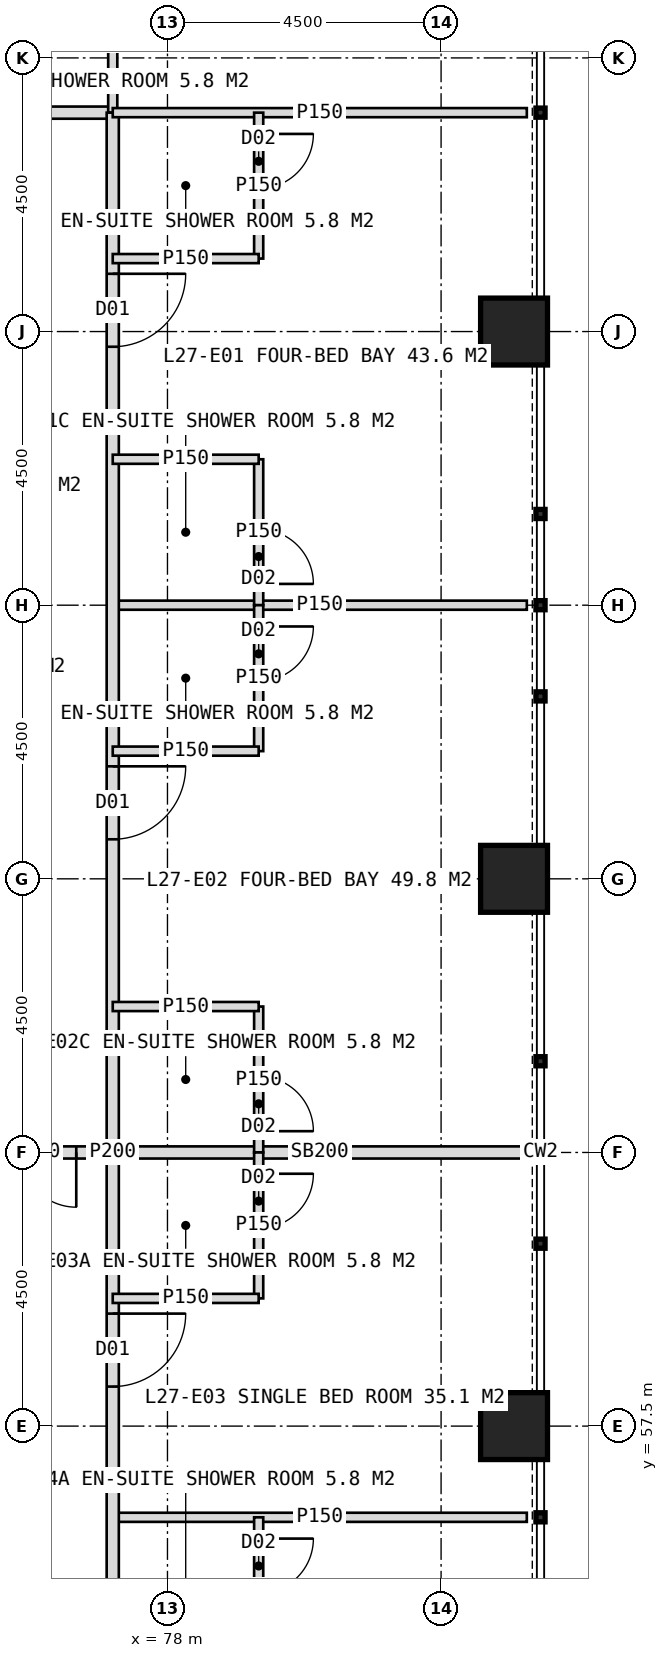
"""IFC4 building model, lengths in metres.
Left out: names, types, materials, properties, quantities, classifications, styles, units other than length and angle.
Written with IfcOpenShell. Run it as: python <this file> out.ifc"""

import sys

from ifc_helpers import new_model, si_unit, direction, frame, frame_2d, origin, origin_2d, place, context, subcontext, project, spatial, rectangle, hollow_rectangle, extrude, element, fill, save


model = new_model("IFC4")
c1 = context("Model", 3, precision=1e-05, world=origin(), true_north=direction((0.0, 1.0)))
c2 = subcontext(c1, "Body", "Model", "MODEL_VIEW")
j1 = project(units=[si_unit("LENGTHUNIT", "METRE"), si_unit("PLANEANGLEUNIT", "RADIAN")], contexts=[c1])
p1 = place(None, origin())
s1 = spatial("IfcSite", under=j1, at=p1, CompositionType="ELEMENT")
p2 = place(p1, origin())
s2 = spatial("IfcBuilding", under=s1, at=p2, CompositionType="ELEMENT")
p3 = place(p2, frame((0.0, 0.0, 116.0)))
s3 = spatial("IfcBuildingStorey", under=s2, at=p3, CompositionType="ELEMENT", Elevation=116.0)
for number, where, z_axis, x_axis in (
    (1, (83.7, 57.5, 0.0), (0.0, 0.0, 1.0), (1.0, 0.0, 0.0)),
    (2, (83.7, 66.5, 0.0), (0.0, 0.0, 1.0), (1.0, 0.0, 0.0)),
    (3, (83.7, 75.5, 0.0), (0.0, 0.0, 1.0), (1.0, 0.0, 0.0)),
):
    element("IfcColumn", number, at=place(p3, frame(where, z_axis=z_axis, x_axis=x_axis)), inside=s3, PredefinedType="COLUMN", context=c2, shape_type="SweptSolid", body=[
        extrude(hollow_rectangle(XDim=1.1, YDim=1.1, WallThickness=0.1, at=origin_2d()), origin(), (0.0, 0.0, 1.0), 4.0),
    ])
p4 = place(p3, frame((42.9, 79.1, 0.0), z_axis=(0.0, 0.0, 1.0), x_axis=(1.0, 0.0, 0.0)))
e4 = element("IfcWall", 4, at=p4, inside=s3, PredefinedType="PARTITIONING", context=c2, shape_type="SweptSolid", body=[
    extrude(rectangle(XDim=34.2, YDim=0.2, at=frame_2d((17.1, 0.0))), origin(), (0.0, 0.0, 1.0), 3.75),
])
p5 = place(p4, frame((3.25, 0.0, 0.0)))
e5 = element("IfcOpeningElement", 5, at=p5, cuts=e4, PredefinedType="OPENING", context=c2, shape_type="SweptSolid", body=[
    extrude(rectangle(XDim=1.2, YDim=2.2, at=frame_2d((0.6, 1.1))), frame((0.0, 0.11, 0.0), z_axis=(0.0, -1.0, 0.0), x_axis=(1.0, 0.0, 0.0)), (0.0, 0.0, 1.0), 0.22),
])
p6 = place(p4, frame((9.25, 0.0, 0.0)))
e6 = element("IfcOpeningElement", 6, at=p6, cuts=e4, PredefinedType="OPENING", context=c2, shape_type="SweptSolid", body=[
    extrude(rectangle(XDim=1.2, YDim=2.2, at=frame_2d((0.6, 1.1))), frame((0.0, 0.11, 0.0), z_axis=(0.0, -1.0, 0.0), x_axis=(1.0, 0.0, 0.0)), (0.0, 0.0, 1.0), 0.22),
])
p7 = place(p4, frame((13.75, 0.0, 0.0)))
e7 = element("IfcOpeningElement", 7, at=p7, cuts=e4, PredefinedType="OPENING", context=c2, shape_type="SweptSolid", body=[
    extrude(rectangle(XDim=1.2, YDim=2.2, at=frame_2d((0.6, 1.1))), frame((0.0, 0.11, 0.0), z_axis=(0.0, -1.0, 0.0), x_axis=(1.0, 0.0, 0.0)), (0.0, 0.0, 1.0), 0.22),
])
p8 = place(p4, frame((19.6, 0.0, 0.0)))
e8 = element("IfcOpeningElement", 8, at=p8, cuts=e4, PredefinedType="OPENING", context=c2, shape_type="SweptSolid", body=[
    extrude(rectangle(XDim=1.0, YDim=2.1, at=frame_2d((0.5, 1.05))), frame((0.0, 0.11, 0.0), z_axis=(0.0, -1.0, 0.0), x_axis=(1.0, 0.0, 0.0)), (0.0, 0.0, 1.0), 0.22),
])
p9 = place(p4, frame((27.25, 0.0, 0.0)))
e9 = element("IfcOpeningElement", 9, at=p9, cuts=e4, PredefinedType="OPENING", context=c2, shape_type="SweptSolid", body=[
    extrude(rectangle(XDim=1.2, YDim=2.2, at=frame_2d((0.6, 1.1))), frame((0.0, 0.11, 0.0), z_axis=(0.0, -1.0, 0.0), x_axis=(1.0, 0.0, 0.0)), (0.0, 0.0, 1.0), 0.22),
])
p10 = place(p3, frame((77.1, 79.1, 0.0), z_axis=(0.0, 0.0, 1.0), x_axis=(0.0, 1.0, 0.0)))
e10 = element("IfcWall", 10, at=p10, inside=s3, PredefinedType="PARTITIONING", context=c2, shape_type="SweptSolid", body=[
    extrude(rectangle(XDim=2.4, YDim=0.15, at=frame_2d((1.2, 0.0))), origin(), (0.0, 0.0, 1.0), 3.75),
])
p11 = place(p3, frame((77.1, 71.0, 0.0), z_axis=(0.0, 0.0, 1.0), x_axis=(1.0, 0.0, 0.0)))
e11 = element("IfcWall", 11, at=p11, inside=s3, PredefinedType="PARTITIONING", context=c2, shape_type="SweptSolid", body=[
    extrude(rectangle(XDim=6.81, YDim=0.15, at=frame_2d((3.405, 0.0))), origin(), (0.0, 0.0, 1.0), 3.75),
])
p12 = place(p3, frame((77.1, 62.0, 0.0), z_axis=(0.0, 0.0, 1.0), x_axis=(1.0, 0.0, 0.0)))
e12 = element("IfcWall", 12, at=p12, inside=s3, PredefinedType="SOLIDWALL", context=c2, shape_type="SweptSolid", body=[
    extrude(rectangle(XDim=6.81, YDim=0.2, at=frame_2d((3.405, 0.0))), origin(), (0.0, 0.0, 1.0), 2.95),
])
p13 = place(p3, frame((77.1, 56.0, 0.0), z_axis=(0.0, 0.0, 1.0), x_axis=(1.0, 0.0, 0.0)))
e13 = element("IfcWall", 13, at=p13, inside=s3, PredefinedType="PARTITIONING", context=c2, shape_type="SweptSolid", body=[
    extrude(rectangle(XDim=6.81, YDim=0.15, at=frame_2d((3.405, 0.0))), origin(), (0.0, 0.0, 1.0), 3.75),
])
p14 = place(p3, frame((77.1, 79.1, 0.0), z_axis=(0.0, 0.0, 1.0), x_axis=(0.0, -1.0, 0.0)))
e14 = element("IfcWall", 14, at=p14, inside=s3, PredefinedType="PARTITIONING", context=c2, shape_type="SweptSolid", body=[
    extrude(rectangle(XDim=34.2, YDim=0.2, at=frame_2d((17.1, 0.0))), origin(), (0.0, 0.0, 1.0), 3.75),
])
p15 = place(p14, frame((2.65, 0.0, 0.0)))
e15 = element("IfcOpeningElement", 15, at=p15, cuts=e14, PredefinedType="OPENING", context=c2, shape_type="SweptSolid", body=[
    extrude(rectangle(XDim=1.2, YDim=2.2, at=frame_2d((0.6, 1.1))), frame((0.0, 0.11, 0.0), z_axis=(0.0, -1.0, 0.0), x_axis=(1.0, 0.0, 0.0)), (0.0, 0.0, 1.0), 0.22),
])
p16 = place(p14, frame((10.75, 0.0, 0.0)))
e16 = element("IfcOpeningElement", 16, at=p16, cuts=e14, PredefinedType="OPENING", context=c2, shape_type="SweptSolid", body=[
    extrude(rectangle(XDim=1.2, YDim=2.2, at=frame_2d((0.6, 1.1))), frame((0.0, 0.11, 0.0), z_axis=(0.0, -1.0, 0.0), x_axis=(1.0, 0.0, 0.0)), (0.0, 0.0, 1.0), 0.22),
])
p17 = place(p14, frame((19.75, 0.0, 0.0)))
e17 = element("IfcOpeningElement", 17, at=p17, cuts=e14, PredefinedType="OPENING", context=c2, shape_type="SweptSolid", body=[
    extrude(rectangle(XDim=1.2, YDim=2.2, at=frame_2d((0.6, 1.1))), frame((0.0, 0.11, 0.0), z_axis=(0.0, -1.0, 0.0), x_axis=(1.0, 0.0, 0.0)), (0.0, 0.0, 1.0), 0.22),
])
p18 = place(p14, frame((25.75, 0.0, 0.0)))
e18 = element("IfcOpeningElement", 18, at=p18, cuts=e14, PredefinedType="OPENING", context=c2, shape_type="SweptSolid", body=[
    extrude(rectangle(XDim=1.2, YDim=2.2, at=frame_2d((0.6, 1.1))), frame((0.0, 0.11, 0.0), z_axis=(0.0, -1.0, 0.0), x_axis=(1.0, 0.0, 0.0)), (0.0, 0.0, 1.0), 0.22),
])
p19 = place(p14, frame((30.25, 0.0, 0.0)))
e19 = element("IfcOpeningElement", 19, at=p19, cuts=e14, PredefinedType="OPENING", context=c2, shape_type="SweptSolid", body=[
    extrude(rectangle(XDim=1.2, YDim=2.2, at=frame_2d((0.6, 1.1))), frame((0.0, 0.11, 0.0), z_axis=(0.0, -1.0, 0.0), x_axis=(1.0, 0.0, 0.0)), (0.0, 0.0, 1.0), 0.22),
])
p20 = place(p3, frame((77.1, 79.1, 0.0), z_axis=(0.0, 0.0, 1.0), x_axis=(1.0, 0.0, 0.0)))
e20 = element("IfcWall", 20, at=p20, inside=s3, PredefinedType="PARTITIONING", context=c2, shape_type="SweptSolid", body=[
    extrude(rectangle(XDim=6.81, YDim=0.15, at=frame_2d((3.405, 0.0))), origin(), (0.0, 0.0, 1.0), 3.75),
])
p21 = place(p3, frame((79.5, 79.1, 0.0), z_axis=(0.0, 0.0, 1.0), x_axis=(0.0, -1.0, 0.0)))
e21 = element("IfcWall", 21, at=p21, inside=s3, PredefinedType="PARTITIONING", context=c2, shape_type="SweptSolid", body=[
    extrude(rectangle(XDim=2.4, YDim=0.15, at=frame_2d((1.2, 0.0))), origin(), (0.0, 0.0, 1.0), 3.75),
])
p22 = place(p21, frame((0.35, 0.0, 0.0)))
e22 = element("IfcOpeningElement", 22, at=p22, cuts=e21, PredefinedType="OPENING", context=c2, shape_type="SweptSolid", body=[
    extrude(rectangle(XDim=0.9, YDim=2.1, at=frame_2d((0.45, 1.05))), frame((0.0, 0.085, 0.0), z_axis=(0.0, -1.0, 0.0), x_axis=(1.0, 0.0, 0.0)), (0.0, 0.0, 1.0), 0.17),
])
p23 = place(p3, frame((77.1, 76.7, 0.0), z_axis=(0.0, 0.0, 1.0), x_axis=(1.0, 0.0, 0.0)))
e23 = element("IfcWall", 23, at=p23, inside=s3, PredefinedType="PARTITIONING", context=c2, shape_type="SweptSolid", body=[
    extrude(rectangle(XDim=2.4, YDim=0.15, at=frame_2d((1.2, 0.0))), origin(), (0.0, 0.0, 1.0), 3.75),
])
p24 = place(p3, frame((79.5, 73.4, 0.0), z_axis=(0.0, 0.0, 1.0), x_axis=(0.0, -1.0, 0.0)))
e24 = element("IfcWall", 24, at=p24, inside=s3, PredefinedType="PARTITIONING", context=c2, shape_type="SweptSolid", body=[
    extrude(rectangle(XDim=2.4, YDim=0.15, at=frame_2d((1.2, 0.0))), origin(), (0.0, 0.0, 1.0), 3.75),
])
p25 = place(p24, frame((1.15, 0.0, 0.0)))
e25 = element("IfcOpeningElement", 25, at=p25, cuts=e24, PredefinedType="OPENING", context=c2, shape_type="SweptSolid", body=[
    extrude(rectangle(XDim=0.9, YDim=2.1, at=frame_2d((0.45, 1.05))), frame((0.0, 0.085, 0.0), z_axis=(0.0, -1.0, 0.0), x_axis=(1.0, 0.0, 0.0)), (0.0, 0.0, 1.0), 0.17),
])
p26 = place(p3, frame((77.1, 73.4, 0.0), z_axis=(0.0, 0.0, 1.0), x_axis=(1.0, 0.0, 0.0)))
e26 = element("IfcWall", 26, at=p26, inside=s3, PredefinedType="PARTITIONING", context=c2, shape_type="SweptSolid", body=[
    extrude(rectangle(XDim=2.4, YDim=0.15, at=frame_2d((1.2, 0.0))), origin(), (0.0, 0.0, 1.0), 3.75),
])
p27 = place(p3, frame((79.5, 71.0, 0.0), z_axis=(0.0, 0.0, 1.0), x_axis=(0.0, -1.0, 0.0)))
e27 = element("IfcWall", 27, at=p27, inside=s3, PredefinedType="PARTITIONING", context=c2, shape_type="SweptSolid", body=[
    extrude(rectangle(XDim=2.4, YDim=0.15, at=frame_2d((1.2, 0.0))), origin(), (0.0, 0.0, 1.0), 3.75),
])
p28 = place(p27, frame((0.35, 0.0, 0.0)))
e28 = element("IfcOpeningElement", 28, at=p28, cuts=e27, PredefinedType="OPENING", context=c2, shape_type="SweptSolid", body=[
    extrude(rectangle(XDim=0.9, YDim=2.1, at=frame_2d((0.45, 1.05))), frame((0.0, 0.085, 0.0), z_axis=(0.0, -1.0, 0.0), x_axis=(1.0, 0.0, 0.0)), (0.0, 0.0, 1.0), 0.17),
])
p29 = place(p3, frame((77.1, 68.6, 0.0), z_axis=(0.0, 0.0, 1.0), x_axis=(1.0, 0.0, 0.0)))
e29 = element("IfcWall", 29, at=p29, inside=s3, PredefinedType="PARTITIONING", context=c2, shape_type="SweptSolid", body=[
    extrude(rectangle(XDim=2.4, YDim=0.15, at=frame_2d((1.2, 0.0))), origin(), (0.0, 0.0, 1.0), 3.75),
])
p30 = place(p3, frame((79.5, 64.4, 0.0), z_axis=(0.0, 0.0, 1.0), x_axis=(0.0, -1.0, 0.0)))
e30 = element("IfcWall", 30, at=p30, inside=s3, PredefinedType="PARTITIONING", context=c2, shape_type="SweptSolid", body=[
    extrude(rectangle(XDim=2.4, YDim=0.15, at=frame_2d((1.2, 0.0))), origin(), (0.0, 0.0, 1.0), 3.75),
])
p31 = place(p30, frame((1.15, 0.0, 0.0)))
e31 = element("IfcOpeningElement", 31, at=p31, cuts=e30, PredefinedType="OPENING", context=c2, shape_type="SweptSolid", body=[
    extrude(rectangle(XDim=0.9, YDim=2.1, at=frame_2d((0.45, 1.05))), frame((0.0, 0.085, 0.0), z_axis=(0.0, -1.0, 0.0), x_axis=(1.0, 0.0, 0.0)), (0.0, 0.0, 1.0), 0.17),
])
p32 = place(p3, frame((77.1, 64.4, 0.0), z_axis=(0.0, 0.0, 1.0), x_axis=(1.0, 0.0, 0.0)))
e32 = element("IfcWall", 32, at=p32, inside=s3, PredefinedType="PARTITIONING", context=c2, shape_type="SweptSolid", body=[
    extrude(rectangle(XDim=2.4, YDim=0.15, at=frame_2d((1.2, 0.0))), origin(), (0.0, 0.0, 1.0), 3.75),
])
p33 = place(p3, frame((79.5, 62.0, 0.0), z_axis=(0.0, 0.0, 1.0), x_axis=(0.0, -1.0, 0.0)))
e33 = element("IfcWall", 33, at=p33, inside=s3, PredefinedType="PARTITIONING", context=c2, shape_type="SweptSolid", body=[
    extrude(rectangle(XDim=2.4, YDim=0.15, at=frame_2d((1.2, 0.0))), origin(), (0.0, 0.0, 1.0), 3.75),
])
p34 = place(p33, frame((0.35, 0.0, 0.0)))
e34 = element("IfcOpeningElement", 34, at=p34, cuts=e33, PredefinedType="OPENING", context=c2, shape_type="SweptSolid", body=[
    extrude(rectangle(XDim=0.9, YDim=2.1, at=frame_2d((0.45, 1.05))), frame((0.0, 0.085, 0.0), z_axis=(0.0, -1.0, 0.0), x_axis=(1.0, 0.0, 0.0)), (0.0, 0.0, 1.0), 0.17),
])
p35 = place(p3, frame((77.1, 59.6, 0.0), z_axis=(0.0, 0.0, 1.0), x_axis=(1.0, 0.0, 0.0)))
e35 = element("IfcWall", 35, at=p35, inside=s3, PredefinedType="PARTITIONING", context=c2, shape_type="SweptSolid", body=[
    extrude(rectangle(XDim=2.4, YDim=0.15, at=frame_2d((1.2, 0.0))), origin(), (0.0, 0.0, 1.0), 3.75),
])
p36 = place(p3, frame((79.5, 56.0, 0.0), z_axis=(0.0, 0.0, 1.0), x_axis=(0.0, -1.0, 0.0)))
e36 = element("IfcWall", 36, at=p36, inside=s3, PredefinedType="PARTITIONING", context=c2, shape_type="SweptSolid", body=[
    extrude(rectangle(XDim=2.4, YDim=0.15, at=frame_2d((1.2, 0.0))), origin(), (0.0, 0.0, 1.0), 3.75),
])
p37 = place(p36, frame((0.35, 0.0, 0.0)))
e37 = element("IfcOpeningElement", 37, at=p37, cuts=e36, PredefinedType="OPENING", context=c2, shape_type="SweptSolid", body=[
    extrude(rectangle(XDim=0.9, YDim=2.1, at=frame_2d((0.45, 1.05))), frame((0.0, 0.085, 0.0), z_axis=(0.0, -1.0, 0.0), x_axis=(1.0, 0.0, 0.0)), (0.0, 0.0, 1.0), 0.17),
])
p38 = place(p3, frame((74.4, 62.0, 0.0), z_axis=(0.0, 0.0, 1.0), x_axis=(1.0, 0.0, 0.0)))
e38 = element("IfcWall", 38, at=p38, inside=s3, PredefinedType="SOLIDWALL", context=c2, shape_type="SweptSolid", body=[
    extrude(rectangle(XDim=2.7, YDim=0.2, at=frame_2d((1.35, 0.0))), origin(), (0.0, 0.0, 1.0), 2.95),
])
p39 = place(p38, frame((0.3, 0.0, 0.0)))
e39 = element("IfcOpeningElement", 39, at=p39, cuts=e38, PredefinedType="OPENING", context=c2, shape_type="SweptSolid", body=[
    extrude(rectangle(XDim=1.8, YDim=2.2, at=frame_2d((0.9, 1.1))), frame((0.0, 0.11, 0.0), z_axis=(0.0, -1.0, 0.0), x_axis=(1.0, 0.0, 0.0)), (0.0, 0.0, 1.0), 0.22),
])
p40 = place(p15, origin())
e40 = element("IfcDoor", 40, at=p40, inside=s3, OperationType="SINGLE_SWING_LEFT", PredefinedType="DOOR", context=c2, shape_type="SweptSolid", body=[
    extrude(rectangle(XDim=1.2, YDim=2.2, at=frame_2d((0.6, 1.1))), frame((0.0, 0.025, 0.0), z_axis=(0.0, -1.0, 0.0), x_axis=(1.0, 0.0, 0.0)), (0.0, 0.0, 1.0), 0.05),
])
fill(e15, e40)
p41 = place(p22, origin())
e41 = element("IfcDoor", 41, at=p41, inside=s3, OperationType="SINGLE_SWING_LEFT", PredefinedType="DOOR", context=c2, shape_type="SweptSolid", body=[
    extrude(rectangle(XDim=0.9, YDim=2.1, at=frame_2d((0.45, 1.05))), frame((0.0, 0.025, 0.0), z_axis=(0.0, -1.0, 0.0), x_axis=(1.0, 0.0, 0.0)), (0.0, 0.0, 1.0), 0.05),
])
fill(e22, e41)
p42 = place(p25, origin())
e42 = element("IfcDoor", 42, at=p42, inside=s3, OperationType="SINGLE_SWING_RIGHT", PredefinedType="DOOR", context=c2, shape_type="SweptSolid", body=[
    extrude(rectangle(XDim=0.9, YDim=2.1, at=frame_2d((0.45, 1.05))), frame((0.0, 0.025, 0.0), z_axis=(0.0, -1.0, 0.0), x_axis=(1.0, 0.0, 0.0)), (0.0, 0.0, 1.0), 0.05),
])
fill(e25, e42)
p43 = place(p16, origin())
e43 = element("IfcDoor", 43, at=p43, inside=s3, OperationType="SINGLE_SWING_LEFT", PredefinedType="DOOR", context=c2, shape_type="SweptSolid", body=[
    extrude(rectangle(XDim=1.2, YDim=2.2, at=frame_2d((0.6, 1.1))), frame((0.0, 0.025, 0.0), z_axis=(0.0, -1.0, 0.0), x_axis=(1.0, 0.0, 0.0)), (0.0, 0.0, 1.0), 0.05),
])
fill(e16, e43)
p44 = place(p28, origin())
e44 = element("IfcDoor", 44, at=p44, inside=s3, OperationType="SINGLE_SWING_LEFT", PredefinedType="DOOR", context=c2, shape_type="SweptSolid", body=[
    extrude(rectangle(XDim=0.9, YDim=2.1, at=frame_2d((0.45, 1.05))), frame((0.0, 0.025, 0.0), z_axis=(0.0, -1.0, 0.0), x_axis=(1.0, 0.0, 0.0)), (0.0, 0.0, 1.0), 0.05),
])
fill(e28, e44)
p45 = place(p31, origin())
e45 = element("IfcDoor", 45, at=p45, inside=s3, OperationType="SINGLE_SWING_RIGHT", PredefinedType="DOOR", context=c2, shape_type="SweptSolid", body=[
    extrude(rectangle(XDim=0.9, YDim=2.1, at=frame_2d((0.45, 1.05))), frame((0.0, 0.025, 0.0), z_axis=(0.0, -1.0, 0.0), x_axis=(1.0, 0.0, 0.0)), (0.0, 0.0, 1.0), 0.05),
])
fill(e31, e45)
p46 = place(p17, origin())
e46 = element("IfcDoor", 46, at=p46, inside=s3, OperationType="SINGLE_SWING_LEFT", PredefinedType="DOOR", context=c2, shape_type="SweptSolid", body=[
    extrude(rectangle(XDim=1.2, YDim=2.2, at=frame_2d((0.6, 1.1))), frame((0.0, 0.025, 0.0), z_axis=(0.0, -1.0, 0.0), x_axis=(1.0, 0.0, 0.0)), (0.0, 0.0, 1.0), 0.05),
])
fill(e17, e46)
p47 = place(p34, origin())
e47 = element("IfcDoor", 47, at=p47, inside=s3, OperationType="SINGLE_SWING_LEFT", PredefinedType="DOOR", context=c2, shape_type="SweptSolid", body=[
    extrude(rectangle(XDim=0.9, YDim=2.1, at=frame_2d((0.45, 1.05))), frame((0.0, 0.025, 0.0), z_axis=(0.0, -1.0, 0.0), x_axis=(1.0, 0.0, 0.0)), (0.0, 0.0, 1.0), 0.05),
])
fill(e34, e47)
p48 = place(p37, origin())
e48 = element("IfcDoor", 48, at=p48, inside=s3, OperationType="SINGLE_SWING_LEFT", PredefinedType="DOOR", context=c2, shape_type="SweptSolid", body=[
    extrude(rectangle(XDim=0.9, YDim=2.1, at=frame_2d((0.45, 1.05))), frame((0.0, 0.025, 0.0), z_axis=(0.0, -1.0, 0.0), x_axis=(1.0, 0.0, 0.0)), (0.0, 0.0, 1.0), 0.05),
])
fill(e37, e48)
p49 = place(p39, origin())
e49 = element("IfcDoor", 49, at=p49, inside=s3, OperationType="DOUBLE_DOOR_DOUBLE_SWING", PredefinedType="DOOR", context=c2, shape_type="SweptSolid", body=[
    extrude(rectangle(XDim=1.8, YDim=2.2, at=frame_2d((0.9, 1.1))), frame((0.0, 0.025, 0.0), z_axis=(0.0, -1.0, 0.0), x_axis=(1.0, 0.0, 0.0)), (0.0, 0.0, 1.0), 0.05),
])
fill(e39, e49)
save(model, sys.argv[1])
